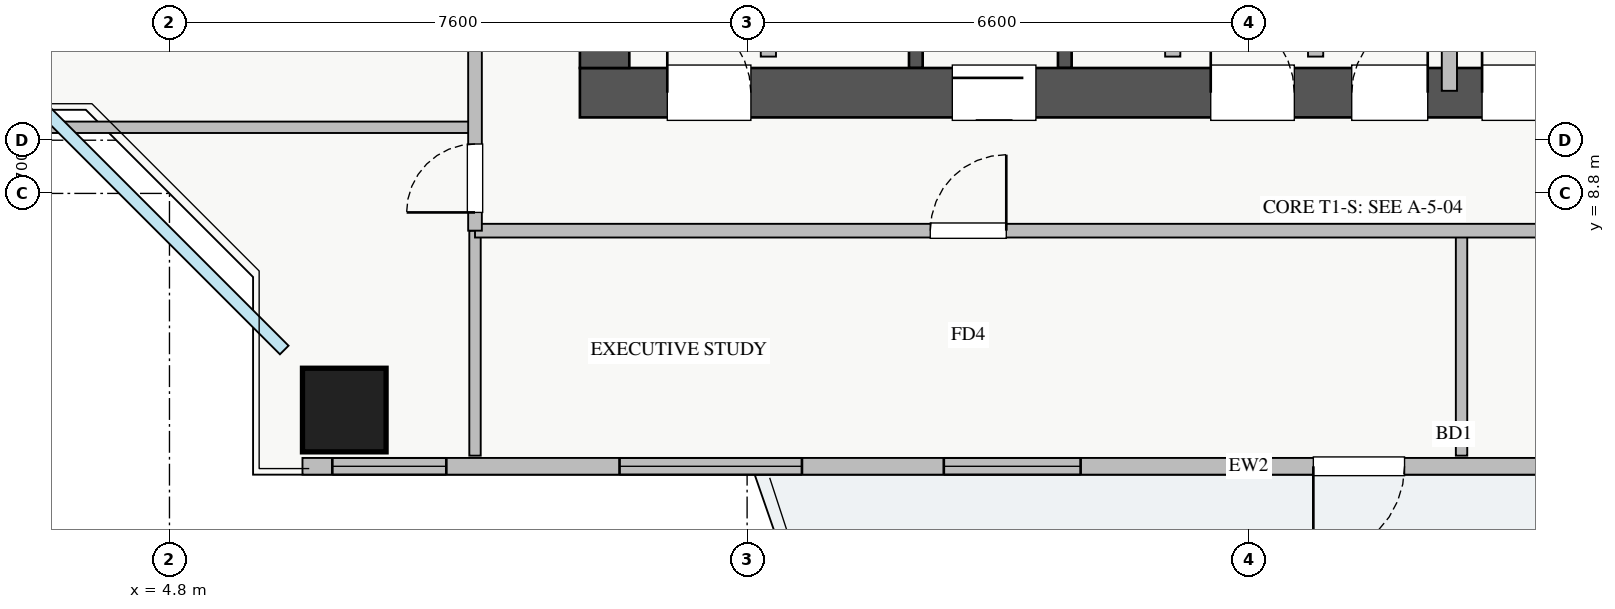
"""IFC4 building model, lengths in metres.
Left out: names, types, materials, properties, quantities, classifications, styles, units other than length and angle.
Written with IfcOpenShell. Run it as: python <this file> out.ifc"""

import sys

from ifc_helpers import new_model, si_unit, direction, frame, frame_2d, origin, origin_2d, place, context, subcontext, project, spatial, rectangle, extrude, source, transform, mapped, element, fill, save


model = new_model("IFC4")
c1 = context("Model", 3, precision=1e-05, world=origin(), true_north=direction((0.0, 1.0)))
c2 = subcontext(c1, "Body", "Model", "MODEL_VIEW")
j1 = project(units=[si_unit("LENGTHUNIT", "METRE"), si_unit("PLANEANGLEUNIT", "RADIAN")], contexts=[c1])
p1 = place(None, origin())
s1 = spatial("IfcSite", under=j1, at=p1, CompositionType="ELEMENT")
p2 = place(p1, origin())
s2 = spatial("IfcBuilding", under=s1, at=p2, CompositionType="ELEMENT")
p3 = place(p2, frame((0.0, 0.0, 132.75)))
s3 = spatial("IfcBuildingStorey", under=s2, at=p3, CompositionType="ELEMENT", Elevation=132.75)
for number, where, z_axis, x_axis in (
    (1, (14.62, 10.45, 0.0), (0.0, 0.0, 1.0), (0.0, 1.0, 0.0)),
    (2, (16.58, 10.45, 0.0), (0.0, 0.0, 1.0), (0.0, 1.0, 0.0)),
):
    element("IfcWall", number, at=place(p3, frame(where, z_axis=z_axis, x_axis=x_axis)), inside=s3, PredefinedType="SHEAR", context=c2, shape_type="SweptSolid", body=[
        extrude(rectangle(XDim=2.35, YDim=0.18, at=frame_2d((1.175, 0.0))), origin(), (0.0, 0.0, 1.0), 3.07),
    ])
p4 = place(p3, frame((10.2, 10.125, 0.0), z_axis=(0.0, 0.0, 1.0), x_axis=(1.0, 0.0, 0.0)))
e3 = element("IfcWall", 3, at=p4, inside=s3, PredefinedType="SHEAR", context=c2, shape_type="SweptSolid", body=[
    extrude(rectangle(XDim=17.6, YDim=0.65, at=frame_2d((8.8, 0.0))), origin(), (0.0, 0.0, 1.0), 3.25),
])
p5 = place(p4, frame((1.15, 0.0, 0.0)))
e4 = element("IfcOpeningElement", 4, at=p5, cuts=e3, PredefinedType="OPENING", context=c2, shape_type="SweptSolid", body=[
    extrude(rectangle(XDim=1.1, YDim=2.05, at=frame_2d((0.55, 1.025))), frame((0.0, 0.335, 0.0), z_axis=(0.0, -1.0, 0.0), x_axis=(1.0, 0.0, 0.0)), (0.0, 0.0, 1.0), 0.67),
])
p6 = place(p4, frame((8.3, 0.0, 0.0)))
e5 = element("IfcOpeningElement", 5, at=p6, cuts=e3, PredefinedType="OPENING", context=c2, shape_type="SweptSolid", body=[
    extrude(rectangle(XDim=1.1, YDim=2.05, at=frame_2d((0.55, 1.025))), frame((0.0, 0.335, 0.0), z_axis=(0.0, -1.0, 0.0), x_axis=(1.0, 0.0, 0.0)), (0.0, 0.0, 1.0), 0.67),
])
p7 = place(p4, frame((4.9, 0.0, 0.0)))
e6 = element("IfcOpeningElement", 6, at=p7, cuts=e3, PredefinedType="OPENING", context=c2, shape_type="SweptSolid", body=[
    extrude(rectangle(XDim=1.1, YDim=2.05, at=frame_2d((0.55, 1.025))), frame((0.0, 0.335, 0.0), z_axis=(0.0, -1.0, 0.0), x_axis=(1.0, 0.0, 0.0)), (0.0, 0.0, 1.0), 0.67),
])
p8 = place(p4, frame((14.74, 0.0, 0.0)))
e7 = element("IfcOpeningElement", 7, at=p8, cuts=e3, PredefinedType="OPENING", context=c2, shape_type="SweptSolid", body=[
    extrude(rectangle(XDim=1.0, YDim=2.05, at=frame_2d((0.5, 1.025))), frame((0.0, 0.335, 0.0), z_axis=(0.0, -1.0, 0.0), x_axis=(1.0, 0.0, 0.0)), (0.0, 0.0, 1.0), 0.67),
])
p9 = place(p4, frame((10.155, 0.0, 0.0)))
e8 = element("IfcOpeningElement", 8, at=p9, cuts=e3, PredefinedType="OPENING", context=c2, shape_type="SweptSolid", body=[
    extrude(rectangle(XDim=1.0, YDim=2.05, at=frame_2d((0.5, 1.025))), frame((0.0, 0.335, 0.0), z_axis=(0.0, -1.0, 0.0), x_axis=(1.0, 0.0, 0.0)), (0.0, 0.0, 1.0), 0.67),
])
p10 = place(p4, frame((11.87, 0.0, 0.0)))
e9 = element("IfcOpeningElement", 9, at=p10, cuts=e3, PredefinedType="OPENING", context=c2, shape_type="SweptSolid", body=[
    extrude(rectangle(XDim=1.0, YDim=2.05, at=frame_2d((0.5, 1.025))), frame((0.0, 0.335, 0.0), z_axis=(0.0, -1.0, 0.0), x_axis=(1.0, 0.0, 0.0)), (0.0, 0.0, 1.0), 0.67),
])
p11 = place(p4, frame((13.46, 0.0, 0.0)))
e10 = element("IfcOpeningElement", 10, at=p11, cuts=e3, PredefinedType="OPENING", context=c2, shape_type="SweptSolid", body=[
    extrude(rectangle(XDim=1.0, YDim=2.05, at=frame_2d((0.5, 1.025))), frame((0.0, 0.335, 0.0), z_axis=(0.0, -1.0, 0.0), x_axis=(1.0, 0.0, 0.0)), (0.0, 0.0, 1.0), 0.67),
])
p12 = place(p3, frame((10.525, 10.45, 0.0), z_axis=(0.0, 0.0, 1.0), x_axis=(0.0, 1.0, 0.0)))
e11 = element("IfcWall", 11, at=p12, inside=s3, PredefinedType="SHEAR", context=c2, shape_type="SweptSolid", body=[
    extrude(rectangle(XDim=5.9, YDim=0.65, at=frame_2d((2.95, 0.0))), origin(), (0.0, 0.0, 1.0), 3.25),
])
m1 = source(origin(), c2, "Body", "SweptSolid", [
    extrude(rectangle(XDim=1.1, YDim=1.1, at=origin_2d()), origin(), (0.0, 0.0, 1.0), 3.25),
])
p13 = place(p3, frame((7.1, 5.95, 0.0), z_axis=(0.0, 0.0, 1.0), x_axis=(1.0, 0.0, 0.0)))
e12 = element("IfcColumn", 12, at=p13, inside=s3, PredefinedType="COLUMN", context=c2, shape_type="MappedRepresentation", body=[
    mapped(m1, transform((0.0, 0.0, 0.0), x_axis=(1.0, 0.0, 0.0), y_axis=(0.0, 1.0, 0.0), z_axis=(0.0, 0.0, 1.0), scale=1.0)),
])
p14 = place(p3, frame((6.55, 5.21, 0.0), z_axis=(0.0, 0.0, 1.0), x_axis=(1.0, 0.0, 0.0)))
e13 = element("IfcWall", 13, at=p14, inside=s3, PredefinedType="STANDARD", context=c2, shape_type="SweptSolid", body=[
    extrude(rectangle(XDim=24.9, YDim=0.22, at=frame_2d((12.45, 0.0))), origin(), (0.0, 0.0, 1.0), 2.61),
])
p15 = place(p14, frame((13.3, 0.0, 0.0)))
e14 = element("IfcOpeningElement", 14, at=p15, cuts=e13, PredefinedType="OPENING", context=c2, shape_type="SweptSolid", body=[
    extrude(rectangle(XDim=1.2, YDim=2.1, at=frame_2d((0.6, 1.05))), frame((0.0, 0.12, 0.0), z_axis=(0.0, -1.0, 0.0), x_axis=(1.0, 0.0, 0.0)), (0.0, 0.0, 1.0), 0.24),
])
p16 = place(p14, frame((0.393, 0.0, 0.9)))
e15 = element("IfcOpeningElement", 15, at=p16, cuts=e13, PredefinedType="OPENING", context=c2, shape_type="SweptSolid", body=[
    extrude(rectangle(XDim=1.5, YDim=1.5, at=frame_2d((0.75, 0.75))), frame((0.0, 0.12, 0.0), z_axis=(0.0, -1.0, 0.0), x_axis=(1.0, 0.0, 0.0)), (0.0, 0.0, 1.0), 0.24),
])
p17 = place(p14, frame((8.438, 0.0, 0.9)))
e16 = element("IfcOpeningElement", 16, at=p17, cuts=e13, PredefinedType="OPENING", context=c2, shape_type="SweptSolid", body=[
    extrude(rectangle(XDim=1.8, YDim=1.45, at=frame_2d((0.9, 0.725))), frame((0.0, 0.12, 0.0), z_axis=(0.0, -1.0, 0.0), x_axis=(1.0, 0.0, 0.0)), (0.0, 0.0, 1.0), 0.24),
])
p18 = place(p14, frame((17.261, 0.0, 0.9)))
e17 = element("IfcOpeningElement", 17, at=p18, cuts=e13, PredefinedType="OPENING", context=c2, shape_type="SweptSolid", body=[
    extrude(rectangle(XDim=1.5, YDim=1.5, at=frame_2d((0.75, 0.75))), frame((0.0, 0.12, 0.0), z_axis=(0.0, -1.0, 0.0), x_axis=(1.0, 0.0, 0.0)), (0.0, 0.0, 1.0), 0.24),
])
p19 = place(p14, frame((20.738, 0.0, 0.9)))
e18 = element("IfcOpeningElement", 18, at=p19, cuts=e13, PredefinedType="OPENING", context=c2, shape_type="SweptSolid", body=[
    extrude(rectangle(XDim=2.1, YDim=1.48, at=frame_2d((1.05, 0.74))), frame((0.0, 0.12, 0.0), z_axis=(0.0, -1.0, 0.0), x_axis=(1.0, 0.0, 0.0)), (0.0, 0.0, 1.0), 0.24),
])
p20 = place(p14, frame((4.171, 0.0, 0.9)))
e19 = element("IfcOpeningElement", 19, at=p20, cuts=e13, PredefinedType="OPENING", context=c2, shape_type="SweptSolid", body=[
    extrude(rectangle(XDim=2.4, YDim=1.5, at=frame_2d((1.2, 0.75))), frame((0.0, 0.12, 0.0), z_axis=(0.0, -1.0, 0.0), x_axis=(1.0, 0.0, 0.0)), (0.0, 0.0, 1.0), 0.24),
])
for number, where, z_axis, x_axis in (
    (20, (12.68, 10.6, 0.0), (0.0, 0.0, 1.0), (0.0, 1.0, 0.0)),
    (21, (18.0, 10.6, 0.0), (0.0, 0.0, 1.0), (0.0, 1.0, 0.0)),
    (22, (19.88, 10.6, 0.0), (0.0, 0.0, 1.0), (0.0, 1.0, 0.0)),
):
    element("IfcWall", number, at=place(p3, frame(where, z_axis=z_axis, x_axis=x_axis)), inside=s3, PredefinedType="PARTITIONING", context=c2, shape_type="SweptSolid", body=[
        extrude(rectangle(XDim=2.21, YDim=0.2, at=frame_2d((1.105, 0.0))), origin(), (0.0, 0.0, 1.0), 3.07),
    ])
p21 = place(p3, frame((21.64, 10.15, 0.0), z_axis=(0.0, 0.0, 1.0), x_axis=(0.0, 1.0, 0.0)))
e23 = element("IfcWall", 23, at=p21, inside=s3, PredefinedType="PARTITIONING", context=c2, shape_type="SweptSolid", body=[
    extrude(rectangle(XDim=2.65, YDim=0.2, at=frame_2d((1.325, 0.0))), origin(), (0.0, 0.0, 1.0), 3.07),
])
for number, where, z_axis, x_axis in (
    (24, (21.8, 5.35, 0.0), (0.0, 0.0, 1.0), (0.0, 1.0, 0.0)),
    (25, (8.82, 5.35, 0.0), (0.0, 0.0, 1.0), (0.0, 1.0, 0.0)),
):
    element("IfcWall", number, at=place(p3, frame(where, z_axis=z_axis, x_axis=x_axis)), inside=s3, PredefinedType="PARTITIONING", context=c2, shape_type="SweptSolid", body=[
        extrude(rectangle(XDim=2.96, YDim=0.15, at=frame_2d((1.48, 0.0))), origin(), (0.0, 0.0, 1.0), 3.07),
    ])
p22 = place(p3, frame((8.82, 8.31, 0.0), z_axis=(0.0, 0.0, 1.0), x_axis=(1.0, 0.0, 0.0)))
e26 = element("IfcWall", 26, at=p22, inside=s3, PredefinedType="PARTITIONING", context=c2, shape_type="SweptSolid", body=[
    extrude(rectangle(XDim=23.58, YDim=0.18, at=frame_2d((11.79, 0.0))), origin(), (0.0, 0.0, 1.0), 3.07),
])
p23 = place(p22, frame((5.99, 0.0, 0.0)))
e27 = element("IfcOpeningElement", 27, at=p23, cuts=e26, PredefinedType="OPENING", context=c2, shape_type="SweptSolid", body=[
    extrude(rectangle(XDim=1.0, YDim=2.05, at=frame_2d((0.5, 1.025))), frame((0.0, 0.1, 0.0), z_axis=(0.0, -1.0, 0.0), x_axis=(1.0, 0.0, 0.0)), (0.0, 0.0, 1.0), 0.2),
])
p24 = place(p22, frame((17.57, 0.0, 0.0)))
e28 = element("IfcOpeningElement", 28, at=p24, cuts=e26, PredefinedType="OPENING", context=c2, shape_type="SweptSolid", body=[
    extrude(rectangle(XDim=1.0, YDim=2.05, at=frame_2d((0.5, 1.025))), frame((0.0, 0.1, 0.0), z_axis=(0.0, -1.0, 0.0), x_axis=(1.0, 0.0, 0.0)), (0.0, 0.0, 1.0), 0.2),
])
p25 = place(p3, frame((1.35, 9.67, 0.0), z_axis=(0.0, 0.0, 1.0), x_axis=(1.0, 0.0, 0.0)))
e29 = element("IfcWall", 29, at=p25, inside=s3, PredefinedType="PARTITIONING", context=c2, shape_type="SweptSolid", body=[
    extrude(rectangle(XDim=7.47, YDim=0.15, at=frame_2d((3.735, 0.0))), origin(), (0.0, 0.0, 1.0), 3.07),
])
p26 = place(p3, frame((8.82, 8.31, 0.0), z_axis=(0.0, 0.0, 1.0), x_axis=(0.0, 1.0, 0.0)))
e30 = element("IfcWall", 30, at=p26, inside=s3, PredefinedType="PARTITIONING", context=c2, shape_type="SweptSolid", body=[
    extrude(rectangle(XDim=29.13, YDim=0.18, at=frame_2d((14.565, 0.0))), origin(), (0.0, 0.0, 1.0), 3.07),
])
p27 = place(p26, frame((27.94, 0.0, 0.0)))
e31 = element("IfcOpeningElement", 31, at=p27, cuts=e30, PredefinedType="OPENING", context=c2, shape_type="SweptSolid", body=[
    extrude(rectangle(XDim=0.9, YDim=2.05, at=frame_2d((0.45, 1.025))), frame((0.0, 0.1, 0.0), z_axis=(0.0, -1.0, 0.0), x_axis=(1.0, 0.0, 0.0)), (0.0, 0.0, 1.0), 0.2),
])
p28 = place(p26, frame((0.24, 0.0, 0.0)))
e32 = element("IfcOpeningElement", 32, at=p28, cuts=e30, PredefinedType="OPENING", context=c2, shape_type="SweptSolid", body=[
    extrude(rectangle(XDim=0.9, YDim=2.05, at=frame_2d((0.45, 1.025))), frame((0.0, 0.1, 0.0), z_axis=(0.0, -1.0, 0.0), x_axis=(1.0, 0.0, 0.0)), (0.0, 0.0, 1.0), 0.2),
])
p29 = place(p26, frame((7.105, 0.0, 0.0)))
e33 = element("IfcOpeningElement", 33, at=p29, cuts=e30, PredefinedType="OPENING", context=c2, shape_type="SweptSolid", body=[
    extrude(rectangle(XDim=1.0, YDim=2.05, at=frame_2d((0.5, 1.025))), frame((0.0, 0.1, 0.0), z_axis=(0.0, -1.0, 0.0), x_axis=(1.0, 0.0, 0.0)), (0.0, 0.0, 1.0), 0.2),
])
p30 = place(p26, frame((16.475, 0.0, 0.0)))
e34 = element("IfcOpeningElement", 34, at=p30, cuts=e30, PredefinedType="OPENING", context=c2, shape_type="SweptSolid", body=[
    extrude(rectangle(XDim=1.0, YDim=2.05, at=frame_2d((0.5, 1.025))), frame((0.0, 0.1, 0.0), z_axis=(0.0, -1.0, 0.0), x_axis=(1.0, 0.0, 0.0)), (0.0, 0.0, 1.0), 0.2),
])
m2 = source(origin(), c2, "Body", "SweptSolid", [
    extrude(rectangle(XDim=1.2, YDim=2.1, at=frame_2d((0.6, 1.05))), frame((0.0, 0.025, 0.0), z_axis=(0.0, -1.0, 0.0), x_axis=(1.0, 0.0, 0.0)), (0.0, 0.0, 1.0), 0.05),
])
p31 = place(p15, frame((1.2, 0.0, 0.0), z_axis=(0.0, 0.0, 1.0), x_axis=(-1.0, 0.0, 0.0)))
e35 = element("IfcDoor", 35, at=p31, inside=s3, OperationType="SINGLE_SWING_LEFT", PredefinedType="DOOR", context=c2, shape_type="MappedRepresentation", body=[
    mapped(m2, transform((0.0, 0.0, 0.0), x_axis=(1.0, 0.0, 0.0), y_axis=(0.0, 1.0, 0.0), z_axis=(0.0, 0.0, 1.0), scale=1.0)),
])
fill(e14, e35)
m3 = source(origin(), c2, "Body", "SweptSolid", [
    extrude(rectangle(XDim=1.5, YDim=1.5, at=frame_2d((0.75, 0.75))), frame((0.0, 0.03, 0.0), z_axis=(0.0, -1.0, 0.0), x_axis=(1.0, 0.0, 0.0)), (0.0, 0.0, 1.0), 0.06),
])
p32 = place(p16, origin())
e36 = element("IfcWindow", 36, at=p32, inside=s3, PartitioningType="TRIPLE_PANEL_VERTICAL", PredefinedType="WINDOW", context=c2, shape_type="MappedRepresentation", body=[
    mapped(m3, transform((0.0, 0.0, 0.0), x_axis=(1.0, 0.0, 0.0), y_axis=(0.0, 1.0, 0.0), z_axis=(0.0, 0.0, 1.0), scale=1.0)),
])
fill(e15, e36)
m4 = source(origin(), c2, "Body", "SweptSolid", [
    extrude(rectangle(XDim=1.8, YDim=1.45, at=frame_2d((0.9, 0.725))), frame((0.0, 0.03, 0.0), z_axis=(0.0, -1.0, 0.0), x_axis=(1.0, 0.0, 0.0)), (0.0, 0.0, 1.0), 0.06),
])
p33 = place(p17, origin())
e37 = element("IfcWindow", 37, at=p33, inside=s3, PartitioningType="DOUBLE_PANEL_VERTICAL", PredefinedType="WINDOW", context=c2, shape_type="MappedRepresentation", body=[
    mapped(m4, transform((0.0, 0.0, 0.0), x_axis=(1.0, 0.0, 0.0), y_axis=(0.0, 1.0, 0.0), z_axis=(0.0, 0.0, 1.0), scale=1.0)),
])
fill(e16, e37)
m5 = source(origin(), c2, "Body", "SweptSolid", [
    extrude(rectangle(XDim=1.1, YDim=2.05, at=frame_2d((0.55, 1.025))), frame((0.0, 0.025, 0.0), z_axis=(0.0, -1.0, 0.0), x_axis=(1.0, 0.0, 0.0)), (0.0, 0.0, 1.0), 0.05),
])
p34 = place(p5, origin())
e38 = element("IfcDoor", 38, at=p34, inside=s3, OperationType="SINGLE_SWING_LEFT", PredefinedType="DOOR", context=c2, shape_type="MappedRepresentation", body=[
    mapped(m5, transform((0.0, 0.0, 0.0), x_axis=(1.0, 0.0, 0.0), y_axis=(0.0, 1.0, 0.0), z_axis=(0.0, 0.0, 1.0), scale=1.0)),
])
fill(e4, e38)
p35 = place(p6, origin())
e39 = element("IfcDoor", 39, at=p35, inside=s3, OperationType="SINGLE_SWING_LEFT", PredefinedType="DOOR", context=c2, shape_type="MappedRepresentation", body=[
    mapped(m5, transform((0.0, 0.0, 0.0), x_axis=(1.0, 0.0, 0.0), y_axis=(0.0, 1.0, 0.0), z_axis=(0.0, 0.0, 1.0), scale=1.0)),
])
fill(e5, e39)
p36 = place(p7, origin())
e40 = element("IfcDoor", 40, at=p36, inside=s3, OperationType="SLIDING_TO_RIGHT", PredefinedType="DOOR", context=c2, shape_type="MappedRepresentation", body=[
    mapped(m5, transform((0.0, 0.0, 0.0), x_axis=(1.0, 0.0, 0.0), y_axis=(0.0, 1.0, 0.0), z_axis=(0.0, 0.0, 1.0), scale=1.0)),
])
fill(e6, e40)
m6 = source(origin(), c2, "Body", "SweptSolid", [
    extrude(rectangle(XDim=1.0, YDim=2.05, at=frame_2d((0.5, 1.025))), frame((0.0, 0.025, 0.0), z_axis=(0.0, -1.0, 0.0), x_axis=(1.0, 0.0, 0.0)), (0.0, 0.0, 1.0), 0.05),
])
p37 = place(p9, origin())
e41 = element("IfcDoor", 41, at=p37, inside=s3, OperationType="SINGLE_SWING_RIGHT", PredefinedType="DOOR", context=c2, shape_type="MappedRepresentation", body=[
    mapped(m6, transform((0.0, 0.0, 0.0), x_axis=(1.0, 0.0, 0.0), y_axis=(0.0, 1.0, 0.0), z_axis=(0.0, 0.0, 1.0), scale=1.0)),
])
fill(e8, e41)
p38 = place(p10, origin())
e42 = element("IfcDoor", 42, at=p38, inside=s3, OperationType="SINGLE_SWING_LEFT", PredefinedType="DOOR", context=c2, shape_type="MappedRepresentation", body=[
    mapped(m6, transform((0.0, 0.0, 0.0), x_axis=(1.0, 0.0, 0.0), y_axis=(0.0, 1.0, 0.0), z_axis=(0.0, 0.0, 1.0), scale=1.0)),
])
fill(e9, e42)
p39 = place(p23, origin())
e43 = element("IfcDoor", 43, at=p39, inside=s3, OperationType="SINGLE_SWING_RIGHT", PredefinedType="DOOR", context=c2, shape_type="MappedRepresentation", body=[
    mapped(m6, transform((0.0, 0.0, 0.0), x_axis=(1.0, 0.0, 0.0), y_axis=(0.0, 1.0, 0.0), z_axis=(0.0, 0.0, 1.0), scale=1.0)),
])
fill(e27, e43)
m7 = source(origin(), c2, "Body", "SweptSolid", [
    extrude(rectangle(XDim=0.9, YDim=2.05, at=frame_2d((0.45, 1.025))), frame((0.0, 0.025, 0.0), z_axis=(0.0, -1.0, 0.0), x_axis=(1.0, 0.0, 0.0)), (0.0, 0.0, 1.0), 0.05),
])
p40 = place(p28, origin())
e44 = element("IfcDoor", 44, at=p40, inside=s3, OperationType="SINGLE_SWING_LEFT", PredefinedType="DOOR", context=c2, shape_type="MappedRepresentation", body=[
    mapped(m7, transform((0.0, 0.0, 0.0), x_axis=(1.0, 0.0, 0.0), y_axis=(0.0, 1.0, 0.0), z_axis=(0.0, 0.0, 1.0), scale=1.0)),
])
fill(e32, e44)
m8 = source(origin(), c2, "Body", "SweptSolid", [
    extrude(rectangle(XDim=2.4, YDim=1.5, at=frame_2d((1.2, 0.75))), frame((0.0, 0.03, 0.0), z_axis=(0.0, -1.0, 0.0), x_axis=(1.0, 0.0, 0.0)), (0.0, 0.0, 1.0), 0.06),
])
p41 = place(p20, origin())
e45 = element("IfcWindow", 45, at=p41, inside=s3, PartitioningType="TRIPLE_PANEL_VERTICAL", PredefinedType="WINDOW", context=c2, shape_type="MappedRepresentation", body=[
    mapped(m8, transform((0.0, 0.0, 0.0), x_axis=(1.0, 0.0, 0.0), y_axis=(0.0, 1.0, 0.0), z_axis=(0.0, 0.0, 1.0), scale=1.0)),
])
fill(e19, e45)
save(model, sys.argv[1])
